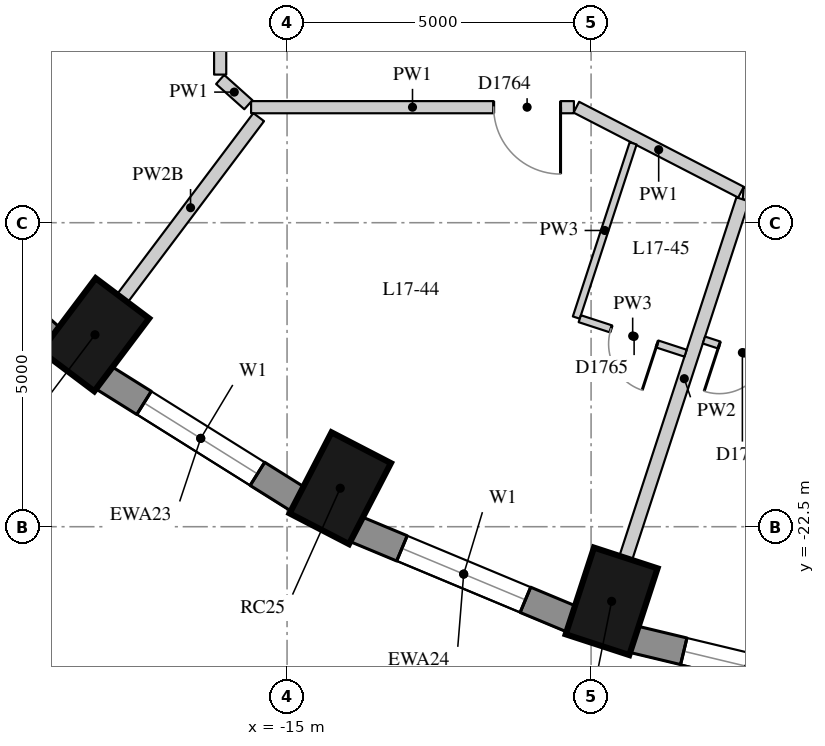
"""IFC4 building model, lengths in metres.
Left out: names, types, materials, properties, quantities, classifications, styles, units other than length and angle.
Written with IfcOpenShell. Run it as: python <this file> out.ifc"""

import sys

from ifc_helpers import new_model, si_unit, direction, frame, frame_2d, origin, origin_2d, place, context, subcontext, project, spatial, rectangle, extrude, element, fill, save


model = new_model("IFC4")
c1 = context("Model", 3, precision=1e-05, world=origin(), true_north=direction((0.0, 1.0)))
c2 = subcontext(c1, "Body", "Model", "MODEL_VIEW")
j1 = project(units=[si_unit("LENGTHUNIT", "METRE"), si_unit("PLANEANGLEUNIT", "RADIAN")], contexts=[c1])
p1 = place(None, origin())
s1 = spatial("IfcSite", under=j1, at=p1, CompositionType="ELEMENT")
p2 = place(p1, origin())
s2 = spatial("IfcBuilding", under=s1, at=p2, CompositionType="ELEMENT")
p3 = place(p2, frame((0.0, 0.0, 64.6)))
s3 = spatial("IfcBuildingStorey", under=s2, at=p3, CompositionType="ELEMENT", Elevation=64.6)
for number, where, z_axis, x_axis in (
    (1, (-18.159, -19.343, 0.0), (0.0, 0.0, 1.0), (-0.601, -0.799, 0.0)),
    (2, (-14.125, -21.867, 0.0), (0.0, 0.0, 1.0), (-0.46, -0.888, 0.0)),
    (3, (-9.662, -23.727, 0.0), (0.0, 0.0, 1.0), (-0.31, -0.951, 0.0)),
):
    element("IfcColumn", number, at=place(p3, frame(where, z_axis=z_axis, x_axis=x_axis)), inside=s3, PredefinedType="COLUMN", context=c2, shape_type="SweptSolid", body=[
        extrude(rectangle(XDim=1.5, YDim=1.1, at=origin_2d()), origin(), (0.0, 0.0, 1.0), 3.3),
    ])
p4 = place(p3, frame((-21.627, -16.943, 0.0), z_axis=(0.0, 0.0, 1.0), x_axis=(0.745526233716, -0.66647628228, 0.0)))
e4 = element("IfcWall", 4, at=p4, inside=s3, PredefinedType="SOLIDWALL", context=c2, shape_type="SweptSolid", body=[
    extrude(rectangle(XDim=3.697, YDim=0.45, at=frame_2d((1.848, 0.0))), origin(), (0.0, 0.0, 1.0), 3.02),
])
p5 = place(p4, frame((0.749, 0.0, 0.4)))
e5 = element("IfcOpeningElement", 5, at=p5, cuts=e4, PredefinedType="OPENING", context=c2, shape_type="SweptSolid", body=[
    extrude(rectangle(XDim=2.2, YDim=1.75, at=frame_2d((1.1, 0.875))), frame((0.0, 0.235, 0.0), z_axis=(0.0, -1.0, 0.0), x_axis=(1.0, 0.0, 0.0)), (0.0, 0.0, 1.0), 0.47),
])
p6 = place(p3, frame((-18.023, -20.044, 0.0), z_axis=(0.0, 0.0, 1.0), x_axis=(0.847635480093, -0.530579016629, 0.0)))
e6 = element("IfcWall", 6, at=p6, inside=s3, PredefinedType="SOLIDWALL", context=c2, shape_type="SweptSolid", body=[
    extrude(rectangle(XDim=3.782, YDim=0.45, at=frame_2d((1.891, 0.0))), origin(), (0.0, 0.0, 1.0), 3.02),
])
p7 = place(p6, frame((0.791, 0.0, 0.4)))
e7 = element("IfcOpeningElement", 7, at=p7, cuts=e6, PredefinedType="OPENING", context=c2, shape_type="SweptSolid", body=[
    extrude(rectangle(XDim=2.2, YDim=1.75, at=frame_2d((1.1, 0.875))), frame((0.0, 0.235, 0.0), z_axis=(0.0, -1.0, 0.0), x_axis=(1.0, 0.0, 0.0)), (0.0, 0.0, 1.0), 0.47),
])
p8 = place(p3, frame((-13.875, -22.537, 0.0), z_axis=(0.0, 0.0, 1.0), x_axis=(0.923031964282, -0.384723267966, 0.0)))
e8 = element("IfcWall", 8, at=p8, inside=s3, PredefinedType="SOLIDWALL", context=c2, shape_type="SweptSolid", body=[
    extrude(rectangle(XDim=3.856, YDim=0.45, at=frame_2d((1.928, 0.0))), origin(), (0.0, 0.0, 1.0), 3.02),
])
p9 = place(p8, frame((0.828, 0.0, 0.4)))
e9 = element("IfcOpeningElement", 9, at=p9, cuts=e8, PredefinedType="OPENING", context=c2, shape_type="SweptSolid", body=[
    extrude(rectangle(XDim=2.2, YDim=1.75, at=frame_2d((1.1, 0.875))), frame((0.0, 0.235, 0.0), z_axis=(0.0, -1.0, 0.0), x_axis=(1.0, 0.0, 0.0)), (0.0, 0.0, 1.0), 0.47),
])
p10 = place(p3, frame((-9.308, -24.35, 0.0), z_axis=(0.0, 0.0, 1.0), x_axis=(0.972496561493, -0.232917233979, 0.0)))
e10 = element("IfcWall", 10, at=p10, inside=s3, PredefinedType="SOLIDWALL", context=c2, shape_type="SweptSolid", body=[
    extrude(rectangle(XDim=3.911, YDim=0.45, at=frame_2d((1.956, 0.0))), origin(), (0.0, 0.0, 1.0), 3.02),
])
p11 = place(p10, frame((0.855, 0.0, 0.4)))
e11 = element("IfcOpeningElement", 11, at=p11, cuts=e10, PredefinedType="OPENING", context=c2, shape_type="SweptSolid", body=[
    extrude(rectangle(XDim=2.2, YDim=1.75, at=frame_2d((1.1, 0.875))), frame((0.0, 0.235, 0.0), z_axis=(0.0, -1.0, 0.0), x_axis=(1.0, 0.0, 0.0)), (0.0, 0.0, 1.0), 0.47),
])
p12 = place(p3, frame((3.778, -17.898, 0.0), z_axis=(0.0, 0.0, 1.0), x_axis=(-0.996963005503, 0.077876605336, 0.0)))
e12 = element("IfcWall", 12, at=p12, inside=s3, PredefinedType="PARTITIONING", context=c2, shape_type="SweptSolid", body=[
    extrude(rectangle(XDim=11.311, YDim=0.2, at=frame_2d((5.656, 0.0))), origin(), (0.0, 0.0, 1.0), 3.02),
])
p13 = place(p12, frame((8.33, 0.0, 0.0)))
e13 = element("IfcOpeningElement", 13, at=p13, cuts=e12, PredefinedType="OPENING", context=c2, shape_type="SweptSolid", body=[
    extrude(rectangle(XDim=1.0, YDim=2.1, at=frame_2d((0.5, 1.05))), frame((0.0, 0.11, 0.0), z_axis=(0.0, -1.0, 0.0), x_axis=(1.0, 0.0, 0.0)), (0.0, 0.0, 1.0), 0.22),
])
p14 = place(p12, frame((5.77, 0.0, 0.0)))
e14 = element("IfcOpeningElement", 14, at=p14, cuts=e12, PredefinedType="OPENING", context=c2, shape_type="SweptSolid", body=[
    extrude(rectangle(XDim=1.0, YDim=2.1, at=frame_2d((0.5, 1.05))), frame((0.0, 0.11, 0.0), z_axis=(0.0, -1.0, 0.0), x_axis=(1.0, 0.0, 0.0)), (0.0, 0.0, 1.0), 0.22),
])
p15 = place(p12, frame((1.45, 0.0, 0.0)))
e15 = element("IfcOpeningElement", 15, at=p15, cuts=e12, PredefinedType="OPENING", context=c2, shape_type="SweptSolid", body=[
    extrude(rectangle(XDim=0.9, YDim=2.1, at=frame_2d((0.45, 1.05))), frame((0.0, 0.11, 0.0), z_axis=(0.0, -1.0, 0.0), x_axis=(1.0, 0.0, 0.0)), (0.0, 0.0, 1.0), 0.22),
])
p16 = place(p3, frame((-7.534, -16.998, 0.0), z_axis=(0.0, 0.0, 1.0), x_axis=(-0.888535328052, 0.458808206992, 0.0)))
e16 = element("IfcWall", 16, at=p16, inside=s3, PredefinedType="PARTITIONING", context=c2, shape_type="SweptSolid", body=[
    extrude(rectangle(XDim=3.047, YDim=0.2, at=frame_2d((1.524, 0.0))), origin(), (0.0, 0.0, 1.0), 3.02),
])
p17 = place(p3, frame((-10.282, -15.6, 0.0), z_axis=(0.0, 0.0, 1.0), x_axis=(-1.0, 0.0, 0.0)))
e17 = element("IfcWall", 17, at=p17, inside=s3, PredefinedType="PARTITIONING", context=c2, shape_type="SweptSolid", body=[
    extrude(rectangle(XDim=5.309, YDim=0.2, at=frame_2d((2.655, 0.0))), origin(), (0.0, 0.0, 1.0), 3.02),
])
p18 = place(p17, frame((0.22, 0.0, 0.0)))
e18 = element("IfcOpeningElement", 18, at=p18, cuts=e17, PredefinedType="OPENING", context=c2, shape_type="SweptSolid", body=[
    extrude(rectangle(XDim=1.1, YDim=2.1, at=frame_2d((0.55, 1.05))), frame((0.0, 0.11, 0.0), z_axis=(0.0, -1.0, 0.0), x_axis=(1.0, 0.0, 0.0)), (0.0, 0.0, 1.0), 0.22),
])
p19 = place(p3, frame((-15.636, -15.56, 0.0), z_axis=(0.0, 0.0, 1.0), x_axis=(-0.744656758283, 0.667447610187, 0.0)))
e19 = element("IfcWall", 19, at=p19, inside=s3, PredefinedType="PARTITIONING", context=c2, shape_type="SweptSolid", body=[
    extrude(rectangle(XDim=0.623, YDim=0.2, at=frame_2d((0.312, 0.0))), origin(), (0.0, 0.0, 1.0), 3.02),
])
p20 = place(p3, frame((-16.1, -15.064, 0.0), z_axis=(0.0, 0.0, 1.0), x_axis=(0.0, 1.0, 0.0)))
e20 = element("IfcWall", 20, at=p20, inside=s3, PredefinedType="PARTITIONING", context=c2, shape_type="SweptSolid", body=[
    extrude(rectangle(XDim=4.113, YDim=0.2, at=frame_2d((2.057, 0.0))), origin(), (0.0, 0.0, 1.0), 3.02),
])
p21 = place(p20, frame((2.793, 0.0, 0.0)))
e21 = element("IfcOpeningElement", 21, at=p21, cuts=e20, PredefinedType="OPENING", context=c2, shape_type="SweptSolid", body=[
    extrude(rectangle(XDim=1.1, YDim=2.1, at=frame_2d((0.55, 1.05))), frame((0.0, 0.11, 0.0), z_axis=(0.0, -1.0, 0.0), x_axis=(1.0, 0.0, 0.0)), (0.0, 0.0, 1.0), 0.22),
])
p22 = place(p3, frame((-17.708, -18.743, 0.0), z_axis=(0.0, 0.0, 1.0), x_axis=(0.601172757903, 0.799119086967, 0.0)))
e22 = element("IfcWall", 22, at=p22, inside=s3, PredefinedType="PARTITIONING", context=c2, shape_type="SweptSolid", body=[
    extrude(rectangle(XDim=3.729, YDim=0.22, at=frame_2d((1.864, 0.0))), origin(), (0.0, 0.0, 1.0), 2.57),
])
p23 = place(p3, frame((-9.429, -23.014, 0.0), z_axis=(0.0, 0.0, 1.0), x_axis=(0.310235573501, 0.950659712481, 0.0)))
e23 = element("IfcWall", 23, at=p23, inside=s3, PredefinedType="PARTITIONING", context=c2, shape_type="SweptSolid", body=[
    extrude(rectangle(XDim=6.204, YDim=0.22, at=frame_2d((3.102, 0.0))), origin(), (0.0, 0.0, 1.0), 3.02),
])
p24 = place(p3, frame((-9.308, -16.195, 0.0), z_axis=(0.0, 0.0, 1.0), x_axis=(-0.310170219214, -0.950681037527, 0.0)))
e24 = element("IfcWall", 24, at=p24, inside=s3, PredefinedType="PARTITIONING", context=c2, shape_type="SweptSolid", body=[
    extrude(rectangle(XDim=3.014, YDim=0.12, at=frame_2d((1.507, 0.0))), origin(), (0.0, 0.0, 1.0), 3.02),
])
p25 = place(p3, frame((-10.186, -19.079, 0.0), z_axis=(0.0, 0.0, 1.0), x_axis=(0.950678536911, -0.31017788357, 0.0)))
e25 = element("IfcWall", 25, at=p25, inside=s3, PredefinedType="PARTITIONING", context=c2, shape_type="SweptSolid", body=[
    extrude(rectangle(XDim=1.83, YDim=0.12, at=frame_2d((0.915, 0.0))), origin(), (0.0, 0.0, 1.0), 3.02),
])
p26 = place(p25, frame((0.54, 0.0, 0.0)))
e26 = element("IfcOpeningElement", 26, at=p26, cuts=e25, PredefinedType="OPENING", context=c2, shape_type="SweptSolid", body=[
    extrude(rectangle(XDim=0.8, YDim=2.1, at=frame_2d((0.4, 1.05))), frame((0.0, 0.07, 0.0), z_axis=(0.0, -1.0, 0.0), x_axis=(1.0, 0.0, 0.0)), (0.0, 0.0, 1.0), 0.14),
])
p27 = place(p3, frame((-6.832, -19.858, 0.0), z_axis=(0.0, 0.0, 1.0), x_axis=(-0.950645927723, 0.31027781117, 0.0)))
e27 = element("IfcWall", 27, at=p27, inside=s3, PredefinedType="PARTITIONING", context=c2, shape_type="SweptSolid", body=[
    extrude(rectangle(XDim=1.38, YDim=0.12, at=frame_2d((0.69, 0.0))), origin(), (0.0, 0.0, 1.0), 3.02),
])
p28 = place(p27, frame((0.315, 0.0, 0.0)))
e28 = element("IfcOpeningElement", 28, at=p28, cuts=e27, PredefinedType="OPENING", context=c2, shape_type="SweptSolid", body=[
    extrude(rectangle(XDim=0.8, YDim=2.1, at=frame_2d((0.4, 1.05))), frame((0.0, 0.07, 0.0), z_axis=(0.0, -1.0, 0.0), x_axis=(1.0, 0.0, 0.0)), (0.0, 0.0, 1.0), 0.14),
])
p29 = place(p7, origin())
e29 = element("IfcWindow", 29, at=p29, inside=s3, PartitioningType="SINGLE_PANEL", PredefinedType="WINDOW", context=c2, shape_type="SweptSolid", body=[
    extrude(rectangle(XDim=2.2, YDim=1.75, at=frame_2d((1.1, 0.875))), frame((0.0, 0.035, 0.0), z_axis=(0.0, -1.0, 0.0), x_axis=(1.0, 0.0, 0.0)), (0.0, 0.0, 1.0), 0.06),
])
fill(e7, e29)
p30 = place(p9, origin())
e30 = element("IfcWindow", 30, at=p30, inside=s3, PartitioningType="SINGLE_PANEL", PredefinedType="WINDOW", context=c2, shape_type="SweptSolid", body=[
    extrude(rectangle(XDim=2.2, YDim=1.75, at=frame_2d((1.1, 0.875))), frame((0.0, 0.035, 0.0), z_axis=(0.0, -1.0, 0.0), x_axis=(1.0, 0.0, 0.0)), (0.0, 0.0, 1.0), 0.06),
])
fill(e9, e30)
p31 = place(p11, origin())
e31 = element("IfcWindow", 31, at=p31, inside=s3, PartitioningType="SINGLE_PANEL", PredefinedType="WINDOW", context=c2, shape_type="SweptSolid", body=[
    extrude(rectangle(XDim=2.2, YDim=1.75, at=frame_2d((1.1, 0.875))), frame((0.0, 0.035, 0.0), z_axis=(0.0, -1.0, 0.0), x_axis=(1.0, 0.0, 0.0)), (0.0, 0.0, 1.0), 0.06),
])
fill(e11, e31)
p32 = place(p18, origin())
e32 = element("IfcDoor", 32, at=p32, inside=s3, OperationType="SINGLE_SWING_LEFT", PredefinedType="DOOR", context=c2, shape_type="SweptSolid", body=[
    extrude(rectangle(XDim=1.1, YDim=2.1, at=frame_2d((0.55, 1.05))), frame((0.0, 0.025, 0.0), z_axis=(0.0, -1.0, 0.0), x_axis=(1.0, 0.0, 0.0)), (0.0, 0.0, 1.0), 0.05),
])
fill(e18, e32)
p33 = place(p26, origin())
e33 = element("IfcDoor", 33, at=p33, inside=s3, OperationType="SINGLE_SWING_LEFT", PredefinedType="DOOR", context=c2, shape_type="SweptSolid", body=[
    extrude(rectangle(XDim=0.8, YDim=2.1, at=frame_2d((0.4, 1.05))), frame((0.0, 0.025, 0.0), z_axis=(0.0, -1.0, 0.0), x_axis=(1.0, 0.0, 0.0)), (0.0, 0.0, 1.0), 0.05),
])
fill(e26, e33)
p34 = place(p28, origin())
e34 = element("IfcDoor", 34, at=p34, inside=s3, OperationType="SINGLE_SWING_RIGHT", PredefinedType="DOOR", context=c2, shape_type="SweptSolid", body=[
    extrude(rectangle(XDim=0.8, YDim=2.1, at=frame_2d((0.4, 1.05))), frame((0.0, 0.025, 0.0), z_axis=(0.0, -1.0, 0.0), x_axis=(1.0, 0.0, 0.0)), (0.0, 0.0, 1.0), 0.05),
])
fill(e28, e34)
save(model, sys.argv[1])
